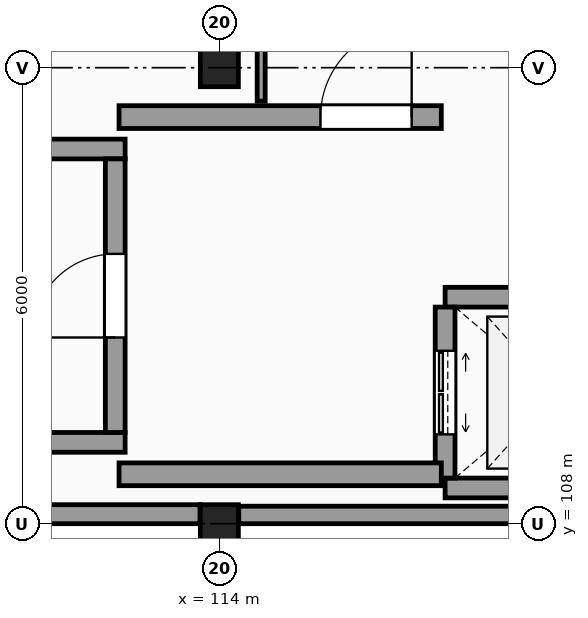
"""IFC4 building model, lengths in metres.
Left out: names, types, materials, properties, quantities, classifications, styles, units other than length and angle.
Written with IfcOpenShell. Run it as: python <this file> out.ifc"""

import sys

from ifc_helpers import new_model, si_unit, direction, frame, frame_2d, origin, origin_2d, place, context, subcontext, project, spatial, rectangle, extrude, element, fill, save


model = new_model("IFC4")
c1 = context("Model", 3, precision=1e-05, world=origin(), true_north=direction((0.0, 1.0)))
c2 = subcontext(c1, "Body", "Model", "MODEL_VIEW")
j1 = project(units=[si_unit("LENGTHUNIT", "METRE"), si_unit("PLANEANGLEUNIT", "RADIAN")], contexts=[c1])
p1 = place(None, origin())
s1 = spatial("IfcSite", under=j1, at=p1, CompositionType="ELEMENT")
p2 = place(p1, origin())
s2 = spatial("IfcBuilding", under=s1, at=p2, CompositionType="ELEMENT")
p3 = place(p2, frame((0.0, 0.0, 48.0)))
s3 = spatial("IfcBuildingStorey", under=s2, at=p3, CompositionType="ELEMENT", Elevation=48.0)
for number, where, z_axis, x_axis in (
    (1, (114.0, 108.0, 0.0), (0.0, 0.0, 1.0), (1.0, 0.0, 0.0)),
    (2, (114.0, 114.0, 0.0), (0.0, 0.0, 1.0), (1.0, 0.0, 0.0)),
):
    element("IfcColumn", number, at=place(p3, frame(where, z_axis=z_axis, x_axis=x_axis)), inside=s3, PredefinedType="COLUMN", context=c2, shape_type="SweptSolid", body=[
        extrude(rectangle(XDim=0.5, YDim=0.5, at=origin_2d()), origin(), (0.0, 0.0, 1.0), 3.3),
    ])
p4 = place(p3, frame((108.255, 108.125, 0.0), z_axis=(0.0, 0.0, 1.0), x_axis=(1.0, 0.0, 0.0)))
e3 = element("IfcWall", 3, at=p4, inside=s3, PredefinedType="SOLIDWALL", context=c2, shape_type="SweptSolid", body=[
    extrude(rectangle(XDim=5.49, YDim=0.25, at=frame_2d((2.745, 0.0))), origin(), (0.0, 0.0, 1.0), 2.4),
])
p5 = place(p3, frame((114.255, 108.115, 0.0), z_axis=(0.0, 0.0, 1.0), x_axis=(1.0, 0.0, 0.0)))
e4 = element("IfcWall", 4, at=p5, inside=s3, PredefinedType="SOLIDWALL", context=c2, shape_type="SweptSolid", body=[
    extrude(rectangle(XDim=5.49, YDim=0.23, at=frame_2d((2.745, 0.0))), origin(), (0.0, 0.0, 1.0), 2.4),
])
for number, where, z_axis, x_axis in (
    (5, (102.04, 109.07, 0.0), (0.0, 0.0, 1.0), (1.0, 0.0, 0.0)),
    (6, (102.04, 112.93, 0.0), (0.0, 0.0, 1.0), (1.0, 0.0, 0.0)),
):
    element("IfcWall", number, at=place(p3, frame(where, z_axis=z_axis, x_axis=x_axis)), inside=s3, PredefinedType="SHEAR", context=c2, shape_type="SweptSolid", body=[
        extrude(rectangle(XDim=10.72, YDim=0.26, at=frame_2d((5.36, 0.0))), origin(), (0.0, 0.0, 1.0), 3.3),
    ])
p6 = place(p3, frame((112.63, 109.2, 0.0), z_axis=(0.0, 0.0, 1.0), x_axis=(0.0, 1.0, 0.0)))
e7 = element("IfcWall", 7, at=p6, inside=s3, PredefinedType="SHEAR", context=c2, shape_type="SweptSolid", body=[
    extrude(rectangle(XDim=3.6, YDim=0.26, at=frame_2d((1.8, 0.0))), origin(), (0.0, 0.0, 1.0), 3.3),
])
p7 = place(p6, frame((1.25, 0.0, 0.0)))
e8 = element("IfcOpeningElement", 8, at=p7, cuts=e7, PredefinedType="OPENING", context=c2, shape_type="SweptSolid", body=[
    extrude(rectangle(XDim=1.1, YDim=2.15, at=frame_2d((0.55, 1.075))), frame((0.0, 0.14, 0.0), z_axis=(0.0, -1.0, 0.0), x_axis=(1.0, 0.0, 0.0)), (0.0, 0.0, 1.0), 0.28),
])
for number, where, z_axis, x_axis in (
    (9, (116.97, 108.47, 0.0), (0.0, 0.0, 1.0), (1.0, 0.0, 0.0)),
    (10, (116.97, 110.98, 0.0), (0.0, 0.0, 1.0), (1.0, 0.0, 0.0)),
):
    element("IfcWall", number, at=place(p3, frame(where, z_axis=z_axis, x_axis=x_axis)), inside=s3, PredefinedType="SHEAR", context=c2, shape_type="SweptSolid", body=[
        extrude(rectangle(XDim=2.91, YDim=0.26, at=frame_2d((1.455, 0.0))), origin(), (0.0, 0.0, 1.0), 3.3),
    ])
p8 = place(p3, frame((116.97, 108.6, 0.0), z_axis=(0.0, 0.0, 1.0), x_axis=(0.0, 1.0, 0.0)))
e11 = element("IfcWall", 11, at=p8, inside=s3, PredefinedType="SHEAR", context=c2, shape_type="SweptSolid", body=[
    extrude(rectangle(XDim=2.25, YDim=0.26, at=frame_2d((1.125, 0.0))), origin(), (0.0, 0.0, 1.0), 3.3),
])
p9 = place(p8, frame((0.575, 0.0, 0.0)))
e12 = element("IfcOpeningElement", 12, at=p9, cuts=e11, PredefinedType="OPENING", context=c2, shape_type="SweptSolid", body=[
    extrude(rectangle(XDim=1.1, YDim=2.2, at=frame_2d((0.55, 1.1))), frame((0.0, 0.14, 0.0), z_axis=(0.0, -1.0, 0.0), x_axis=(1.0, 0.0, 0.0)), (0.0, 0.0, 1.0), 0.28),
])
p10 = place(p3, frame((112.68, 113.35, 0.0), z_axis=(0.0, 0.0, 1.0), x_axis=(1.0, 0.0, 0.0)))
e13 = element("IfcWall", 13, at=p10, inside=s3, PredefinedType="SHEAR", context=c2, shape_type="SweptSolid", body=[
    extrude(rectangle(XDim=4.24, YDim=0.3, at=frame_2d((2.12, 0.0))), origin(), (0.0, 0.0, 1.0), 3.3),
])
p11 = place(p10, frame((2.65, 0.0, 0.0)))
e14 = element("IfcOpeningElement", 14, at=p11, cuts=e13, PredefinedType="OPENING", context=c2, shape_type="SweptSolid", body=[
    extrude(rectangle(XDim=1.2, YDim=2.2, at=frame_2d((0.6, 1.1))), frame((0.0, 0.16, 0.0), z_axis=(0.0, -1.0, 0.0), x_axis=(1.0, 0.0, 0.0)), (0.0, 0.0, 1.0), 0.32),
])
p12 = place(p3, frame((112.68, 108.65, 0.0), z_axis=(0.0, 0.0, 1.0), x_axis=(1.0, 0.0, 0.0)))
e15 = element("IfcWall", 15, at=p12, inside=s3, PredefinedType="SHEAR", context=c2, shape_type="SweptSolid", body=[
    extrude(rectangle(XDim=4.24, YDim=0.3, at=frame_2d((2.12, 0.0))), origin(), (0.0, 0.0, 1.0), 3.3),
])
p13 = place(p3, frame((114.55, 113.56, 0.0), z_axis=(0.0, 0.0, 1.0), x_axis=(0.0, 1.0, 0.0)))
e16 = element("IfcWall", 16, at=p13, inside=s3, PredefinedType="PARTITIONING", context=c2, shape_type="SweptSolid", body=[
    extrude(rectangle(XDim=2.24, YDim=0.105, at=frame_2d((1.12, 0.0))), origin(), (0.0, 0.0, 1.0), 3.05),
])
p14 = place(p7, origin())
e17 = element("IfcDoor", 17, at=p14, inside=s3, OperationType="SINGLE_SWING_LEFT", PredefinedType="DOOR", context=c2, shape_type="SweptSolid", body=[
    extrude(rectangle(XDim=1.1, YDim=2.15, at=frame_2d((0.55, 1.075))), frame((0.0, 0.025, 0.0), z_axis=(0.0, -1.0, 0.0), x_axis=(1.0, 0.0, 0.0)), (0.0, 0.0, 1.0), 0.05),
])
fill(e8, e17)
p15 = place(p9, origin())
e18 = element("IfcDoor", 18, at=p15, inside=s3, OperationType="DOUBLE_DOOR_SLIDING", PredefinedType="DOOR", context=c2, shape_type="SweptSolid", body=[
    extrude(rectangle(XDim=1.1, YDim=2.2, at=frame_2d((0.55, 1.1))), frame((0.0, 0.025, 0.0), z_axis=(0.0, -1.0, 0.0), x_axis=(1.0, 0.0, 0.0)), (0.0, 0.0, 1.0), 0.05),
])
fill(e12, e18)
p16 = place(p11, origin())
e19 = element("IfcDoor", 19, at=p16, inside=s3, OperationType="SINGLE_SWING_RIGHT", PredefinedType="DOOR", context=c2, shape_type="SweptSolid", body=[
    extrude(rectangle(XDim=1.2, YDim=2.2, at=frame_2d((0.6, 1.1))), frame((0.0, 0.025, 0.0), z_axis=(0.0, -1.0, 0.0), x_axis=(1.0, 0.0, 0.0)), (0.0, 0.0, 1.0), 0.05),
])
fill(e14, e19)
save(model, sys.argv[1])
